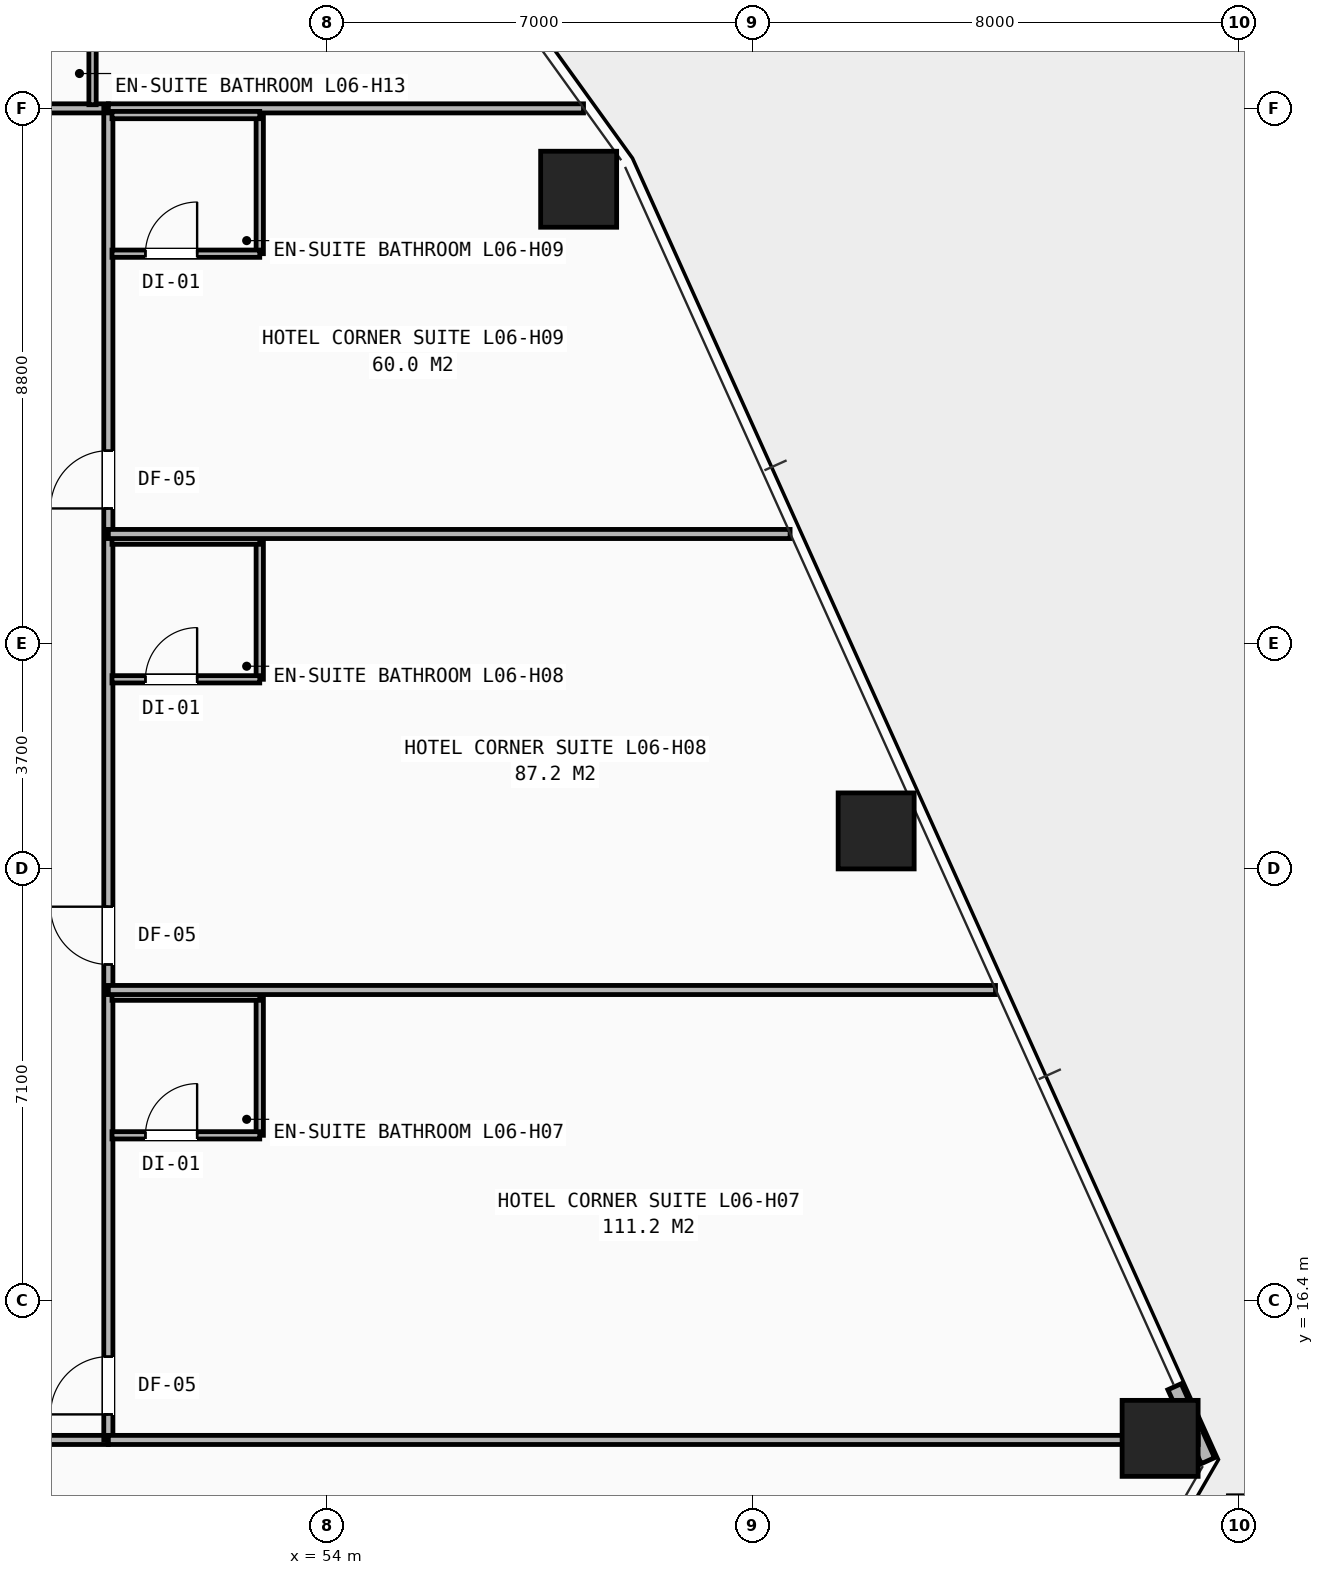
"""IFC4 building model, lengths in metres.
Left out: names, types, materials, properties, quantities, classifications, styles, units other than length and angle.
Written with IfcOpenShell. Run it as: python <this file> out.ifc"""

import sys

from ifc_helpers import new_model, si_unit, direction, frame, frame_2d, origin, origin_2d, place, context, subcontext, project, spatial, rectangle, hollow_rectangle, extrude, element, fill, save


model = new_model("IFC4")
c1 = context("Model", 3, precision=1e-05, world=origin(), true_north=direction((0.0, 1.0)))
c2 = subcontext(c1, "Body", "Model", "MODEL_VIEW")
j1 = project(units=[si_unit("LENGTHUNIT", "METRE"), si_unit("PLANEANGLEUNIT", "RADIAN")], contexts=[c1])
p1 = place(None, origin())
s1 = spatial("IfcSite", under=j1, at=p1, CompositionType="ELEMENT")
p2 = place(p1, origin())
s2 = spatial("IfcBuilding", under=s1, at=p2, CompositionType="ELEMENT")
p3 = place(p2, frame((0.0, 0.0, 27.2)))
s3 = spatial("IfcBuildingStorey", under=s2, at=p3, CompositionType="ELEMENT", Elevation=27.2)
for number, where, z_axis, x_axis in (
    (1, (67.697, 14.126, 0.0), (0.0, 0.0, 1.0), (1.0, 0.0, 0.0)),
    (2, (63.027, 24.116, 0.0), (0.0, 0.0, 1.0), (1.0, 0.0, 0.0)),
    (3, (58.135, 34.67, 0.0), (0.0, 0.0, 1.0), (1.0, 0.0, 0.0)),
):
    element("IfcColumn", number, at=place(p3, frame(where, z_axis=z_axis, x_axis=x_axis)), inside=s3, PredefinedType="COLUMN", context=c2, shape_type="SweptSolid", body=[
        extrude(hollow_rectangle(XDim=1.25, YDim=1.25, WallThickness=0.08, at=origin_2d()), origin(), (0.0, 0.0, 1.0), 3.2),
    ])
p4 = place(p3, frame((68.483, 13.758, 0.0), z_axis=(0.0, 0.0, 1.0), x_axis=(-0.410767856127, 0.91173996752, 0.0)))
e4 = element("IfcWall", 4, at=p4, inside=s3, PredefinedType="SHEAR", context=c2, shape_type="SweptSolid", body=[
    extrude(rectangle(XDim=1.334, YDim=0.24, at=frame_2d((0.667, 0.0))), origin(), (0.0, 0.0, 1.0), 2.263),
])
p5 = place(p3, frame((29.6, 14.1, 0.0), z_axis=(0.0, 0.0, 1.0), x_axis=(1.0, 0.0, 0.0)))
e5 = element("IfcWall", 5, at=p5, inside=s3, PredefinedType="PARTITIONING", context=c2, shape_type="SweptSolid", body=[
    extrude(rectangle(XDim=20.8, YDim=0.15, at=frame_2d((10.4, 0.0))), origin(), (0.0, 0.0, 1.0), 2.431),
])
p6 = place(p5, frame((0.57, 0.0, 0.0)))
e6 = element("IfcOpeningElement", 6, at=p6, cuts=e5, PredefinedType="OPENING", context=c2, shape_type="SweptSolid", body=[
    extrude(rectangle(XDim=0.95, YDim=2.1, at=frame_2d((0.475, 1.05))), frame((0.0, 0.085, 0.0), z_axis=(0.0, -1.0, 0.0), x_axis=(1.0, 0.0, 0.0)), (0.0, 0.0, 1.0), 0.17),
])
p7 = place(p5, frame((5.32, 0.0, 0.0)))
e7 = element("IfcOpeningElement", 7, at=p7, cuts=e5, PredefinedType="OPENING", context=c2, shape_type="SweptSolid", body=[
    extrude(rectangle(XDim=0.95, YDim=2.1, at=frame_2d((0.475, 1.05))), frame((0.0, 0.085, 0.0), z_axis=(0.0, -1.0, 0.0), x_axis=(1.0, 0.0, 0.0)), (0.0, 0.0, 1.0), 0.17),
])
p8 = place(p5, frame((13.32, 0.0, 0.0)))
e8 = element("IfcOpeningElement", 8, at=p8, cuts=e5, PredefinedType="OPENING", context=c2, shape_type="SweptSolid", body=[
    extrude(rectangle(XDim=0.95, YDim=2.1, at=frame_2d((0.475, 1.05))), frame((0.0, 0.085, 0.0), z_axis=(0.0, -1.0, 0.0), x_axis=(1.0, 0.0, 0.0)), (0.0, 0.0, 1.0), 0.17),
])
p9 = place(p3, frame((41.475, 36.0, 0.0), z_axis=(0.0, 0.0, 1.0), x_axis=(1.0, 0.0, 0.0)))
e9 = element("IfcWall", 9, at=p9, inside=s3, PredefinedType="PARTITIONING", context=c2, shape_type="SweptSolid", body=[
    extrude(rectangle(XDim=8.925, YDim=0.15, at=frame_2d((4.462, 0.0))), origin(), (0.0, 0.0, 1.0), 2.513),
])
p10 = place(p9, frame((0.2, 0.0, 0.0)))
e10 = element("IfcOpeningElement", 10, at=p10, cuts=e9, PredefinedType="OPENING", context=c2, shape_type="SweptSolid", body=[
    extrude(rectangle(XDim=0.95, YDim=2.1, at=frame_2d((0.475, 1.05))), frame((0.0, 0.085, 0.0), z_axis=(0.0, -1.0, 0.0), x_axis=(1.0, 0.0, 0.0)), (0.0, 0.0, 1.0), 0.17),
])
p11 = place(p9, frame((4.445, 0.0, 0.0)))
e11 = element("IfcOpeningElement", 11, at=p11, cuts=e9, PredefinedType="OPENING", context=c2, shape_type="SweptSolid", body=[
    extrude(rectangle(XDim=0.95, YDim=2.1, at=frame_2d((0.475, 1.05))), frame((0.0, 0.085, 0.0), z_axis=(0.0, -1.0, 0.0), x_axis=(1.0, 0.0, 0.0)), (0.0, 0.0, 1.0), 0.17),
])
p12 = place(p3, frame((50.4, 14.1, 0.0), z_axis=(0.0, 0.0, 1.0), x_axis=(0.0, 1.0, 0.0)))
e12 = element("IfcWall", 12, at=p12, inside=s3, PredefinedType="PARTITIONING", context=c2, shape_type="SweptSolid", body=[
    extrude(rectangle(XDim=21.9, YDim=0.15, at=frame_2d((10.95, 0.0))), origin(), (0.0, 0.0, 1.0), 2.431),
])
p13 = place(p12, frame((0.42, 0.0, 0.0)))
e13 = element("IfcOpeningElement", 13, at=p13, cuts=e12, PredefinedType="OPENING", context=c2, shape_type="SweptSolid", body=[
    extrude(rectangle(XDim=0.95, YDim=2.1, at=frame_2d((0.475, 1.05))), frame((0.0, 0.085, 0.0), z_axis=(0.0, -1.0, 0.0), x_axis=(1.0, 0.0, 0.0)), (0.0, 0.0, 1.0), 0.17),
])
p14 = place(p12, frame((7.82, 0.0, 0.0)))
e14 = element("IfcOpeningElement", 14, at=p14, cuts=e12, PredefinedType="OPENING", context=c2, shape_type="SweptSolid", body=[
    extrude(rectangle(XDim=0.95, YDim=2.1, at=frame_2d((0.475, 1.05))), frame((0.0, 0.085, 0.0), z_axis=(0.0, -1.0, 0.0), x_axis=(1.0, 0.0, 0.0)), (0.0, 0.0, 1.0), 0.17),
])
p15 = place(p12, frame((15.32, 0.0, 0.0)))
e15 = element("IfcOpeningElement", 15, at=p15, cuts=e12, PredefinedType="OPENING", context=c2, shape_type="SweptSolid", body=[
    extrude(rectangle(XDim=0.95, YDim=2.1, at=frame_2d((0.475, 1.05))), frame((0.0, 0.085, 0.0), z_axis=(0.0, -1.0, 0.0), x_axis=(1.0, 0.0, 0.0)), (0.0, 0.0, 1.0), 0.17),
])
p16 = place(p3, frame((50.4, 14.1, 0.0), z_axis=(0.0, 0.0, 1.0), x_axis=(1.0, 0.0, 0.0)))
e16 = element("IfcWall", 16, at=p16, inside=s3, PredefinedType="PARTITIONING", context=c2, shape_type="SweptSolid", body=[
    extrude(rectangle(XDim=17.923, YDim=0.15, at=frame_2d((8.961, 0.0))), origin(), (0.0, 0.0, 1.0), 2.268),
])
p17 = place(p3, frame((50.4, 36.0, 0.0), z_axis=(0.0, 0.0, 1.0), x_axis=(1.0, 0.0, 0.0)))
e17 = element("IfcWall", 17, at=p17, inside=s3, PredefinedType="PARTITIONING", context=c2, shape_type="SweptSolid", body=[
    extrude(rectangle(XDim=7.814, YDim=0.15, at=frame_2d((3.907, 0.0))), origin(), (0.0, 0.0, 1.0), 2.268),
])
p18 = place(p3, frame((52.89, 19.11, 0.0), z_axis=(0.0, 0.0, 1.0), x_axis=(0.0, 1.0, 0.0)))
e18 = element("IfcWall", 18, at=p18, inside=s3, PredefinedType="PARTITIONING", context=c2, shape_type="SweptSolid", body=[
    extrude(rectangle(XDim=2.28, YDim=0.12, at=frame_2d((1.14, 0.0))), origin(), (0.0, 0.0, 1.0), 2.98),
])
p19 = place(p3, frame((50.46, 19.11, 0.0), z_axis=(0.0, 0.0, 1.0), x_axis=(1.0, 0.0, 0.0)))
e19 = element("IfcWall", 19, at=p19, inside=s3, PredefinedType="PARTITIONING", context=c2, shape_type="SweptSolid", body=[
    extrude(rectangle(XDim=2.43, YDim=0.12, at=frame_2d((1.215, 0.0))), origin(), (0.0, 0.0, 1.0), 2.98),
])
p20 = place(p19, frame((0.55, 0.0, 0.0)))
e20 = element("IfcOpeningElement", 20, at=p20, cuts=e19, PredefinedType="OPENING", context=c2, shape_type="SweptSolid", body=[
    extrude(rectangle(XDim=0.85, YDim=2.05, at=frame_2d((0.425, 1.025))), frame((0.0, 0.07, 0.0), z_axis=(0.0, -1.0, 0.0), x_axis=(1.0, 0.0, 0.0)), (0.0, 0.0, 1.0), 0.14),
])
p21 = place(p3, frame((50.46, 21.39, 0.0), z_axis=(0.0, 0.0, 1.0), x_axis=(1.0, 0.0, 0.0)))
e21 = element("IfcWall", 21, at=p21, inside=s3, PredefinedType="PARTITIONING", context=c2, shape_type="SweptSolid", body=[
    extrude(rectangle(XDim=2.43, YDim=0.12, at=frame_2d((1.215, 0.0))), origin(), (0.0, 0.0, 1.0), 2.98),
])
p22 = place(p3, frame((50.4, 21.5, 0.0), z_axis=(0.0, 0.0, 1.0), x_axis=(1.0, 0.0, 0.0)))
e22 = element("IfcWall", 22, at=p22, inside=s3, PredefinedType="PARTITIONING", context=c2, shape_type="SweptSolid", body=[
    extrude(rectangle(XDim=14.59, YDim=0.15, at=frame_2d((7.295, 0.0))), origin(), (0.0, 0.0, 1.0), 2.268),
])
p23 = place(p3, frame((52.89, 26.61, 0.0), z_axis=(0.0, 0.0, 1.0), x_axis=(0.0, 1.0, 0.0)))
e23 = element("IfcWall", 23, at=p23, inside=s3, PredefinedType="PARTITIONING", context=c2, shape_type="SweptSolid", body=[
    extrude(rectangle(XDim=2.28, YDim=0.12, at=frame_2d((1.14, 0.0))), origin(), (0.0, 0.0, 1.0), 2.98),
])
p24 = place(p3, frame((50.46, 26.61, 0.0), z_axis=(0.0, 0.0, 1.0), x_axis=(1.0, 0.0, 0.0)))
e24 = element("IfcWall", 24, at=p24, inside=s3, PredefinedType="PARTITIONING", context=c2, shape_type="SweptSolid", body=[
    extrude(rectangle(XDim=2.43, YDim=0.12, at=frame_2d((1.215, 0.0))), origin(), (0.0, 0.0, 1.0), 2.98),
])
p25 = place(p24, frame((0.55, 0.0, 0.0)))
e25 = element("IfcOpeningElement", 25, at=p25, cuts=e24, PredefinedType="OPENING", context=c2, shape_type="SweptSolid", body=[
    extrude(rectangle(XDim=0.85, YDim=2.05, at=frame_2d((0.425, 1.025))), frame((0.0, 0.07, 0.0), z_axis=(0.0, -1.0, 0.0), x_axis=(1.0, 0.0, 0.0)), (0.0, 0.0, 1.0), 0.14),
])
p26 = place(p3, frame((50.46, 28.89, 0.0), z_axis=(0.0, 0.0, 1.0), x_axis=(1.0, 0.0, 0.0)))
e26 = element("IfcWall", 26, at=p26, inside=s3, PredefinedType="PARTITIONING", context=c2, shape_type="SweptSolid", body=[
    extrude(rectangle(XDim=2.43, YDim=0.12, at=frame_2d((1.215, 0.0))), origin(), (0.0, 0.0, 1.0), 2.98),
])
p27 = place(p3, frame((50.4, 29.0, 0.0), z_axis=(0.0, 0.0, 1.0), x_axis=(1.0, 0.0, 0.0)))
e27 = element("IfcWall", 27, at=p27, inside=s3, PredefinedType="PARTITIONING", context=c2, shape_type="SweptSolid", body=[
    extrude(rectangle(XDim=11.212, YDim=0.15, at=frame_2d((5.606, 0.0))), origin(), (0.0, 0.0, 1.0), 2.268),
])
p28 = place(p3, frame((52.89, 33.61, 0.0), z_axis=(0.0, 0.0, 1.0), x_axis=(0.0, 1.0, 0.0)))
e28 = element("IfcWall", 28, at=p28, inside=s3, PredefinedType="PARTITIONING", context=c2, shape_type="SweptSolid", body=[
    extrude(rectangle(XDim=2.28, YDim=0.12, at=frame_2d((1.14, 0.0))), origin(), (0.0, 0.0, 1.0), 2.98),
])
p29 = place(p3, frame((50.46, 33.61, 0.0), z_axis=(0.0, 0.0, 1.0), x_axis=(1.0, 0.0, 0.0)))
e29 = element("IfcWall", 29, at=p29, inside=s3, PredefinedType="PARTITIONING", context=c2, shape_type="SweptSolid", body=[
    extrude(rectangle(XDim=2.43, YDim=0.12, at=frame_2d((1.215, 0.0))), origin(), (0.0, 0.0, 1.0), 2.513),
])
p30 = place(p29, frame((0.55, 0.0, 0.0)))
e30 = element("IfcOpeningElement", 30, at=p30, cuts=e29, PredefinedType="OPENING", context=c2, shape_type="SweptSolid", body=[
    extrude(rectangle(XDim=0.85, YDim=2.05, at=frame_2d((0.425, 1.025))), frame((0.0, 0.07, 0.0), z_axis=(0.0, -1.0, 0.0), x_axis=(1.0, 0.0, 0.0)), (0.0, 0.0, 1.0), 0.14),
])
for number, where, z_axis, x_axis in (
    (31, (50.46, 35.89, 0.0), (0.0, 0.0, 1.0), (1.0, 0.0, 0.0)),
    (32, (50.14, 36.06, 0.0), (0.0, 0.0, 1.0), (0.0, 1.0, 0.0)),
):
    element("IfcWall", number, at=place(p3, frame(where, z_axis=z_axis, x_axis=x_axis)), inside=s3, PredefinedType="PARTITIONING", context=c2, shape_type="SweptSolid", body=[
        extrude(rectangle(XDim=2.43, YDim=0.12, at=frame_2d((1.215, 0.0))), origin(), (0.0, 0.0, 1.0), 2.513),
    ])
p31 = place(p3, frame((0.0, 0.0, -0.3)))
p32 = place(p31, frame((70.0, 12.0, 0.0)))
p33 = place(p32, frame((0.0, 0.0, 0.25)))
e33 = element("IfcWindow", 33, at=p33, inside=s3, PartitioningType="SINGLE_PANEL", PredefinedType="SKYLIGHT", context=c2, shape_type="SweptSolid", body=[
    extrude(rectangle(XDim=2.4, YDim=2.4, at=origin_2d()), origin(), (0.0, 0.0, 1.0), 0.05),
])
p34 = place(p13, origin())
e34 = element("IfcDoor", 34, at=p34, inside=s3, OperationType="SINGLE_SWING_LEFT", PredefinedType="DOOR", context=c2, shape_type="SweptSolid", body=[
    extrude(rectangle(XDim=0.95, YDim=2.1, at=frame_2d((0.475, 1.05))), frame((0.0, 0.025, 0.0), z_axis=(0.0, -1.0, 0.0), x_axis=(1.0, 0.0, 0.0)), (0.0, 0.0, 1.0), 0.05),
])
fill(e13, e34)
p35 = place(p20, origin())
e35 = element("IfcDoor", 35, at=p35, inside=s3, OperationType="SINGLE_SWING_RIGHT", PredefinedType="DOOR", context=c2, shape_type="SweptSolid", body=[
    extrude(rectangle(XDim=0.85, YDim=2.05, at=frame_2d((0.425, 1.025))), frame((0.0, 0.025, 0.0), z_axis=(0.0, -1.0, 0.0), x_axis=(1.0, 0.0, 0.0)), (0.0, 0.0, 1.0), 0.05),
])
fill(e20, e35)
p36 = place(p14, origin())
e36 = element("IfcDoor", 36, at=p36, inside=s3, OperationType="SINGLE_SWING_RIGHT", PredefinedType="DOOR", context=c2, shape_type="SweptSolid", body=[
    extrude(rectangle(XDim=0.95, YDim=2.1, at=frame_2d((0.475, 1.05))), frame((0.0, 0.025, 0.0), z_axis=(0.0, -1.0, 0.0), x_axis=(1.0, 0.0, 0.0)), (0.0, 0.0, 1.0), 0.05),
])
fill(e14, e36)
p37 = place(p25, origin())
e37 = element("IfcDoor", 37, at=p37, inside=s3, OperationType="SINGLE_SWING_RIGHT", PredefinedType="DOOR", context=c2, shape_type="SweptSolid", body=[
    extrude(rectangle(XDim=0.85, YDim=2.05, at=frame_2d((0.425, 1.025))), frame((0.0, 0.025, 0.0), z_axis=(0.0, -1.0, 0.0), x_axis=(1.0, 0.0, 0.0)), (0.0, 0.0, 1.0), 0.05),
])
fill(e25, e37)
p38 = place(p15, origin())
e38 = element("IfcDoor", 38, at=p38, inside=s3, OperationType="SINGLE_SWING_LEFT", PredefinedType="DOOR", context=c2, shape_type="SweptSolid", body=[
    extrude(rectangle(XDim=0.95, YDim=2.1, at=frame_2d((0.475, 1.05))), frame((0.0, 0.025, 0.0), z_axis=(0.0, -1.0, 0.0), x_axis=(1.0, 0.0, 0.0)), (0.0, 0.0, 1.0), 0.05),
])
fill(e15, e38)
p39 = place(p30, origin())
e39 = element("IfcDoor", 39, at=p39, inside=s3, OperationType="SINGLE_SWING_RIGHT", PredefinedType="DOOR", context=c2, shape_type="SweptSolid", body=[
    extrude(rectangle(XDim=0.85, YDim=2.05, at=frame_2d((0.425, 1.025))), frame((0.0, 0.025, 0.0), z_axis=(0.0, -1.0, 0.0), x_axis=(1.0, 0.0, 0.0)), (0.0, 0.0, 1.0), 0.05),
])
fill(e30, e39)
save(model, sys.argv[1])
